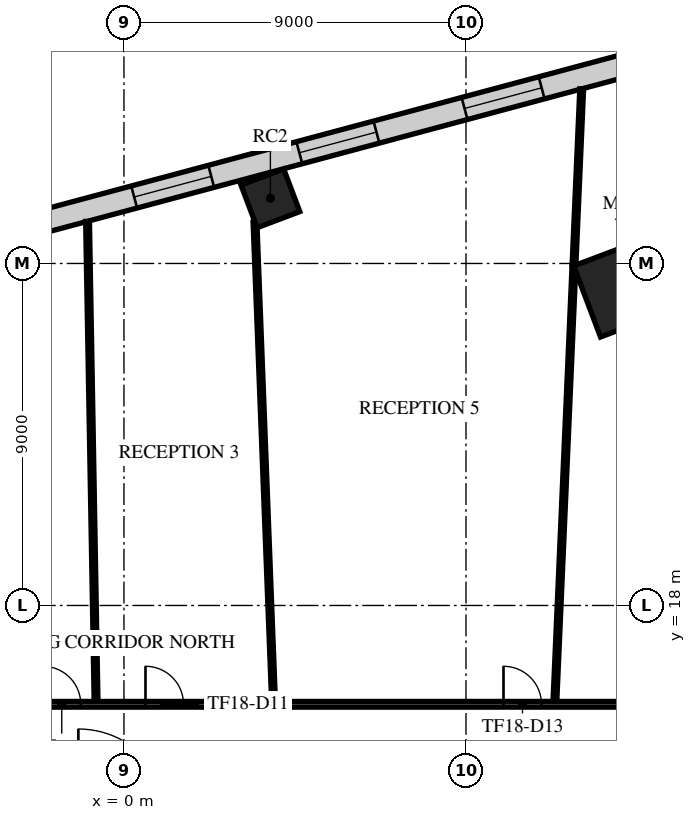
"""IFC4 building model, lengths in metres.
Left out: names, types, materials, properties, quantities, classifications, styles, units other than length and angle.
Written with IfcOpenShell. Run it as: python <this file> out.ifc"""

import sys

from ifc_helpers import new_model, si_unit, direction, frame, frame_2d, origin, origin_2d, place, context, subcontext, project, spatial, rectangle, extrude, element, fill, save


model = new_model("IFC4")
c1 = context("Model", 3, precision=1e-05, world=origin(), true_north=direction((0.0, 1.0)))
c2 = subcontext(c1, "Body", "Model", "MODEL_VIEW")
j1 = project(units=[si_unit("LENGTHUNIT", "METRE"), si_unit("PLANEANGLEUNIT", "RADIAN")], contexts=[c1])
p1 = place(None, origin())
s1 = spatial("IfcSite", under=j1, at=p1, CompositionType="ELEMENT")
p2 = place(p1, origin())
s2 = spatial("IfcBuilding", under=s1, at=p2, CompositionType="ELEMENT")
p3 = place(p2, frame((0.0, 0.0, 82.1)))
s3 = spatial("IfcBuildingStorey", under=s2, at=p3, CompositionType="ELEMENT", Elevation=82.1)
p4 = place(p3, frame((13.122, 26.354, -0.42), z_axis=(0.0, 0.0, 1.0), x_axis=(0.935491525991, 0.353349125935, 0.0)))
e1 = element("IfcColumn", 1, at=p4, inside=s3, PredefinedType="COLUMN", context=c2, shape_type="SweptSolid", body=[
    extrude(rectangle(XDim=2.0, YDim=2.0, at=origin_2d()), origin(), (0.0, 0.0, 1.0), 4.42),
])
p5 = place(p3, frame((3.853, 28.714, -0.42), z_axis=(0.0, 0.0, 1.0), x_axis=(0.935491525991, 0.353349125935, 0.0)))
e2 = element("IfcColumn", 2, at=p5, inside=s3, PredefinedType="COLUMN", context=c2, shape_type="SweptSolid", body=[
    extrude(rectangle(XDim=1.2, YDim=1.2, at=origin_2d()), origin(), (0.0, 0.0, 1.0), 4.42),
])
p6 = place(p3, frame((16.496, 33.097, 0.0), z_axis=(0.0, 0.0, 1.0), x_axis=(-0.965926333894, -0.258817150689, 0.0)))
e3 = element("IfcWall", 3, at=p6, inside=s3, PredefinedType="STANDARD", context=c2, shape_type="SweptSolid", body=[
    extrude(rectangle(XDim=49.376, YDim=0.6, at=frame_2d((24.688, 0.0))), origin(), (0.0, 0.0, 1.0), 3.58),
])
p7 = place(p6, frame((1.2, 0.0, 0.9)))
e4 = element("IfcOpeningElement", 4, at=p7, cuts=e3, PredefinedType="OPENING", context=c2, shape_type="SweptSolid", body=[
    extrude(rectangle(XDim=2.1, YDim=2.1, at=frame_2d((1.05, 1.05))), frame((0.0, 0.31, 0.0), z_axis=(0.0, -1.0, 0.0), x_axis=(1.0, 0.0, 0.0)), (0.0, 0.0, 1.0), 0.62),
])
p8 = place(p6, frame((5.7, 0.0, 0.9)))
e5 = element("IfcOpeningElement", 5, at=p8, cuts=e3, PredefinedType="OPENING", context=c2, shape_type="SweptSolid", body=[
    extrude(rectangle(XDim=2.1, YDim=2.1, at=frame_2d((1.05, 1.05))), frame((0.0, 0.31, 0.0), z_axis=(0.0, -1.0, 0.0), x_axis=(1.0, 0.0, 0.0)), (0.0, 0.0, 1.0), 0.62),
])
p9 = place(p6, frame((10.2, 0.0, 0.9)))
e6 = element("IfcOpeningElement", 6, at=p9, cuts=e3, PredefinedType="OPENING", context=c2, shape_type="SweptSolid", body=[
    extrude(rectangle(XDim=2.1, YDim=2.1, at=frame_2d((1.05, 1.05))), frame((0.0, 0.31, 0.0), z_axis=(0.0, -1.0, 0.0), x_axis=(1.0, 0.0, 0.0)), (0.0, 0.0, 1.0), 0.62),
])
p10 = place(p6, frame((14.7, 0.0, 0.9)))
e7 = element("IfcOpeningElement", 7, at=p10, cuts=e3, PredefinedType="OPENING", context=c2, shape_type="SweptSolid", body=[
    extrude(rectangle(XDim=2.1, YDim=2.1, at=frame_2d((1.05, 1.05))), frame((0.0, 0.31, 0.0), z_axis=(0.0, -1.0, 0.0), x_axis=(1.0, 0.0, 0.0)), (0.0, 0.0, 1.0), 0.62),
])
p11 = place(p6, frame((19.2, 0.0, 0.9)))
e8 = element("IfcOpeningElement", 8, at=p11, cuts=e3, PredefinedType="OPENING", context=c2, shape_type="SweptSolid", body=[
    extrude(rectangle(XDim=2.1, YDim=2.1, at=frame_2d((1.05, 1.05))), frame((0.0, 0.31, 0.0), z_axis=(0.0, -1.0, 0.0), x_axis=(1.0, 0.0, 0.0)), (0.0, 0.0, 1.0), 0.62),
])
p12 = place(p6, frame((23.7, 0.0, 0.9)))
e9 = element("IfcOpeningElement", 9, at=p12, cuts=e3, PredefinedType="OPENING", context=c2, shape_type="SweptSolid", body=[
    extrude(rectangle(XDim=2.1, YDim=2.1, at=frame_2d((1.05, 1.05))), frame((0.0, 0.31, 0.0), z_axis=(0.0, -1.0, 0.0), x_axis=(1.0, 0.0, 0.0)), (0.0, 0.0, 1.0), 0.62),
])
p13 = place(p6, frame((28.2, 0.0, 0.9)))
e10 = element("IfcOpeningElement", 10, at=p13, cuts=e3, PredefinedType="OPENING", context=c2, shape_type="SweptSolid", body=[
    extrude(rectangle(XDim=2.1, YDim=2.1, at=frame_2d((1.05, 1.05))), frame((0.0, 0.31, 0.0), z_axis=(0.0, -1.0, 0.0), x_axis=(1.0, 0.0, 0.0)), (0.0, 0.0, 1.0), 0.62),
])
p14 = place(p6, frame((32.7, 0.0, 0.9)))
e11 = element("IfcOpeningElement", 11, at=p14, cuts=e3, PredefinedType="OPENING", context=c2, shape_type="SweptSolid", body=[
    extrude(rectangle(XDim=2.1, YDim=2.1, at=frame_2d((1.05, 1.05))), frame((0.0, 0.31, 0.0), z_axis=(0.0, -1.0, 0.0), x_axis=(1.0, 0.0, 0.0)), (0.0, 0.0, 1.0), 0.62),
])
p15 = place(p6, frame((37.2, 0.0, 0.9)))
e12 = element("IfcOpeningElement", 12, at=p15, cuts=e3, PredefinedType="OPENING", context=c2, shape_type="SweptSolid", body=[
    extrude(rectangle(XDim=2.1, YDim=2.1, at=frame_2d((1.05, 1.05))), frame((0.0, 0.31, 0.0), z_axis=(0.0, -1.0, 0.0), x_axis=(1.0, 0.0, 0.0)), (0.0, 0.0, 1.0), 0.62),
])
p16 = place(p6, frame((41.7, 0.0, 0.9)))
e13 = element("IfcOpeningElement", 13, at=p16, cuts=e3, PredefinedType="OPENING", context=c2, shape_type="SweptSolid", body=[
    extrude(rectangle(XDim=2.1, YDim=2.1, at=frame_2d((1.05, 1.05))), frame((0.0, 0.31, 0.0), z_axis=(0.0, -1.0, 0.0), x_axis=(1.0, 0.0, 0.0)), (0.0, 0.0, 1.0), 0.62),
])
p17 = place(p6, frame((46.138, 0.0, 0.9)))
e14 = element("IfcOpeningElement", 14, at=p17, cuts=e3, PredefinedType="OPENING", context=c2, shape_type="SweptSolid", body=[
    extrude(rectangle(XDim=2.1, YDim=2.1, at=frame_2d((1.05, 1.05))), frame((0.0, 0.31, 0.0), z_axis=(0.0, -1.0, 0.0), x_axis=(1.0, 0.0, 0.0)), (0.0, 0.0, 1.0), 0.62),
])
p18 = place(p3, frame((-15.325, 15.4, 0.0), z_axis=(0.0, 0.0, 1.0), x_axis=(1.0, 0.0, 0.0)))
e15 = element("IfcWall", 15, at=p18, inside=s3, PredefinedType="PARTITIONING", context=c2, shape_type="SweptSolid", body=[
    extrude(rectangle(XDim=30.725, YDim=0.15, at=frame_2d((15.362, 0.0))), origin(), (0.0, 0.0, 1.0), 3.08),
])
p19 = place(p18, frame((2.05, 0.0, 0.0)))
e16 = element("IfcOpeningElement", 16, at=p19, cuts=e15, PredefinedType="OPENING", context=c2, shape_type="SweptSolid", body=[
    extrude(rectangle(XDim=1.8, YDim=2.1, at=frame_2d((0.9, 1.05))), frame((0.0, 0.085, 0.0), z_axis=(0.0, -1.0, 0.0), x_axis=(1.0, 0.0, 0.0)), (0.0, 0.0, 1.0), 0.17),
])
p20 = place(p18, frame((13.188, 0.0, 0.0)))
e17 = element("IfcOpeningElement", 17, at=p20, cuts=e15, PredefinedType="OPENING", context=c2, shape_type="SweptSolid", body=[
    extrude(rectangle(XDim=1.0, YDim=2.1, at=frame_2d((0.5, 1.05))), frame((0.0, 0.085, 0.0), z_axis=(0.0, -1.0, 0.0), x_axis=(1.0, 0.0, 0.0)), (0.0, 0.0, 1.0), 0.17),
])
p21 = place(p18, frame((15.892, 0.0, 0.0)))
e18 = element("IfcOpeningElement", 18, at=p21, cuts=e15, PredefinedType="OPENING", context=c2, shape_type="SweptSolid", body=[
    extrude(rectangle(XDim=1.0, YDim=2.1, at=frame_2d((0.5, 1.05))), frame((0.0, 0.085, 0.0), z_axis=(0.0, -1.0, 0.0), x_axis=(1.0, 0.0, 0.0)), (0.0, 0.0, 1.0), 0.17),
])
p22 = place(p18, frame((25.312, 0.0, 0.0)))
e19 = element("IfcOpeningElement", 19, at=p22, cuts=e15, PredefinedType="OPENING", context=c2, shape_type="SweptSolid", body=[
    extrude(rectangle(XDim=1.0, YDim=2.1, at=frame_2d((0.5, 1.05))), frame((0.0, 0.085, 0.0), z_axis=(0.0, -1.0, 0.0), x_axis=(1.0, 0.0, 0.0)), (0.0, 0.0, 1.0), 0.17),
])
p23 = place(p18, frame((29.211, 0.0, 0.0)))
e20 = element("IfcOpeningElement", 20, at=p23, cuts=e15, PredefinedType="OPENING", context=c2, shape_type="SweptSolid", body=[
    extrude(rectangle(XDim=1.0, YDim=2.1, at=frame_2d((0.5, 1.05))), frame((0.0, 0.085, 0.0), z_axis=(0.0, -1.0, 0.0), x_axis=(1.0, 0.0, 0.0)), (0.0, 0.0, 1.0), 0.17),
])
p24 = place(p3, frame((-0.958, 28.108, 0.0), z_axis=(0.0, 0.0, 1.0), x_axis=(0.017700788333, -0.999843328773, 0.0)))
e21 = element("IfcWall", 21, at=p24, inside=s3, PredefinedType="PARTITIONING", context=c2, shape_type="SweptSolid", body=[
    extrude(rectangle(XDim=12.634, YDim=0.1, at=frame_2d((6.317, 0.0))), origin(), (0.0, 0.0, 1.0), 3.58),
])
p25 = place(p3, frame((3.448, 28.089, 0.0), z_axis=(0.0, 0.0, 1.0), x_axis=(0.038608436219, -0.999254416379, 0.0)))
e22 = element("IfcWall", 22, at=p25, inside=s3, PredefinedType="PARTITIONING", context=c2, shape_type="SweptSolid", body=[
    extrude(rectangle(XDim=12.622, YDim=0.1, at=frame_2d((6.311, 0.0))), origin(), (0.0, 0.0, 1.0), 2.96),
])
p26 = place(p3, frame((11.339, 15.477, 0.0), z_axis=(0.0, 0.0, 1.0), x_axis=(0.04370366829, 0.999044538235, 0.0)))
e23 = element("IfcWall", 23, at=p26, inside=s3, PredefinedType="PARTITIONING", context=c2, shape_type="SweptSolid", body=[
    extrude(rectangle(XDim=11.452, YDim=0.1, at=frame_2d((5.726, 0.0))), origin(), (0.0, 0.0, 1.0), 3.58),
])
p27 = place(p3, frame((11.841, 26.939, 0.0), z_axis=(0.0, 0.0, 1.0), x_axis=(0.04372159787, 0.999043753736, 0.0)))
e24 = element("IfcWall", 24, at=p27, inside=s3, PredefinedType="PARTITIONING", context=c2, shape_type="SweptSolid", body=[
    extrude(rectangle(XDim=4.657, YDim=0.1, at=frame_2d((2.329, 0.0))), origin(), (0.0, 0.0, 1.0), 3.58),
])
p28 = place(p8, origin())
e25 = element("IfcWindow", 25, at=p28, inside=s3, PartitioningType="SINGLE_PANEL", PredefinedType="WINDOW", context=c2, shape_type="SweptSolid", body=[
    extrude(rectangle(XDim=2.1, YDim=2.1, at=frame_2d((1.05, 1.05))), frame((0.0, 0.03, 0.0), z_axis=(0.0, -1.0, 0.0), x_axis=(1.0, 0.0, 0.0)), (0.0, 0.0, 1.0), 0.06),
])
fill(e5, e25)
p29 = place(p9, origin())
e26 = element("IfcWindow", 26, at=p29, inside=s3, PartitioningType="SINGLE_PANEL", PredefinedType="WINDOW", context=c2, shape_type="SweptSolid", body=[
    extrude(rectangle(XDim=2.1, YDim=2.1, at=frame_2d((1.05, 1.05))), frame((0.0, 0.03, 0.0), z_axis=(0.0, -1.0, 0.0), x_axis=(1.0, 0.0, 0.0)), (0.0, 0.0, 1.0), 0.06),
])
fill(e6, e26)
p30 = place(p10, origin())
e27 = element("IfcWindow", 27, at=p30, inside=s3, PartitioningType="SINGLE_PANEL", PredefinedType="WINDOW", context=c2, shape_type="SweptSolid", body=[
    extrude(rectangle(XDim=2.1, YDim=2.1, at=frame_2d((1.05, 1.05))), frame((0.0, 0.03, 0.0), z_axis=(0.0, -1.0, 0.0), x_axis=(1.0, 0.0, 0.0)), (0.0, 0.0, 1.0), 0.06),
])
fill(e7, e27)
p31 = place(p20, origin())
e28 = element("IfcDoor", 28, at=p31, inside=s3, OperationType="SINGLE_SWING_RIGHT", PredefinedType="DOOR", context=c2, shape_type="SweptSolid", body=[
    extrude(rectangle(XDim=1.0, YDim=2.1, at=frame_2d((0.5, 1.05))), frame((0.0, 0.025, 0.0), z_axis=(0.0, -1.0, 0.0), x_axis=(1.0, 0.0, 0.0)), (0.0, 0.0, 1.0), 0.05),
])
fill(e17, e28)
p32 = place(p21, origin())
e29 = element("IfcDoor", 29, at=p32, inside=s3, OperationType="SINGLE_SWING_LEFT", PredefinedType="DOOR", context=c2, shape_type="SweptSolid", body=[
    extrude(rectangle(XDim=1.0, YDim=2.1, at=frame_2d((0.5, 1.05))), frame((0.0, 0.025, 0.0), z_axis=(0.0, -1.0, 0.0), x_axis=(1.0, 0.0, 0.0)), (0.0, 0.0, 1.0), 0.05),
])
fill(e18, e29)
p33 = place(p22, origin())
e30 = element("IfcDoor", 30, at=p33, inside=s3, OperationType="SINGLE_SWING_RIGHT", PredefinedType="DOOR", context=c2, shape_type="SweptSolid", body=[
    extrude(rectangle(XDim=1.0, YDim=2.1, at=frame_2d((0.5, 1.05))), frame((0.0, 0.025, 0.0), z_axis=(0.0, -1.0, 0.0), x_axis=(1.0, 0.0, 0.0)), (0.0, 0.0, 1.0), 0.05),
])
fill(e19, e30)
save(model, sys.argv[1])
